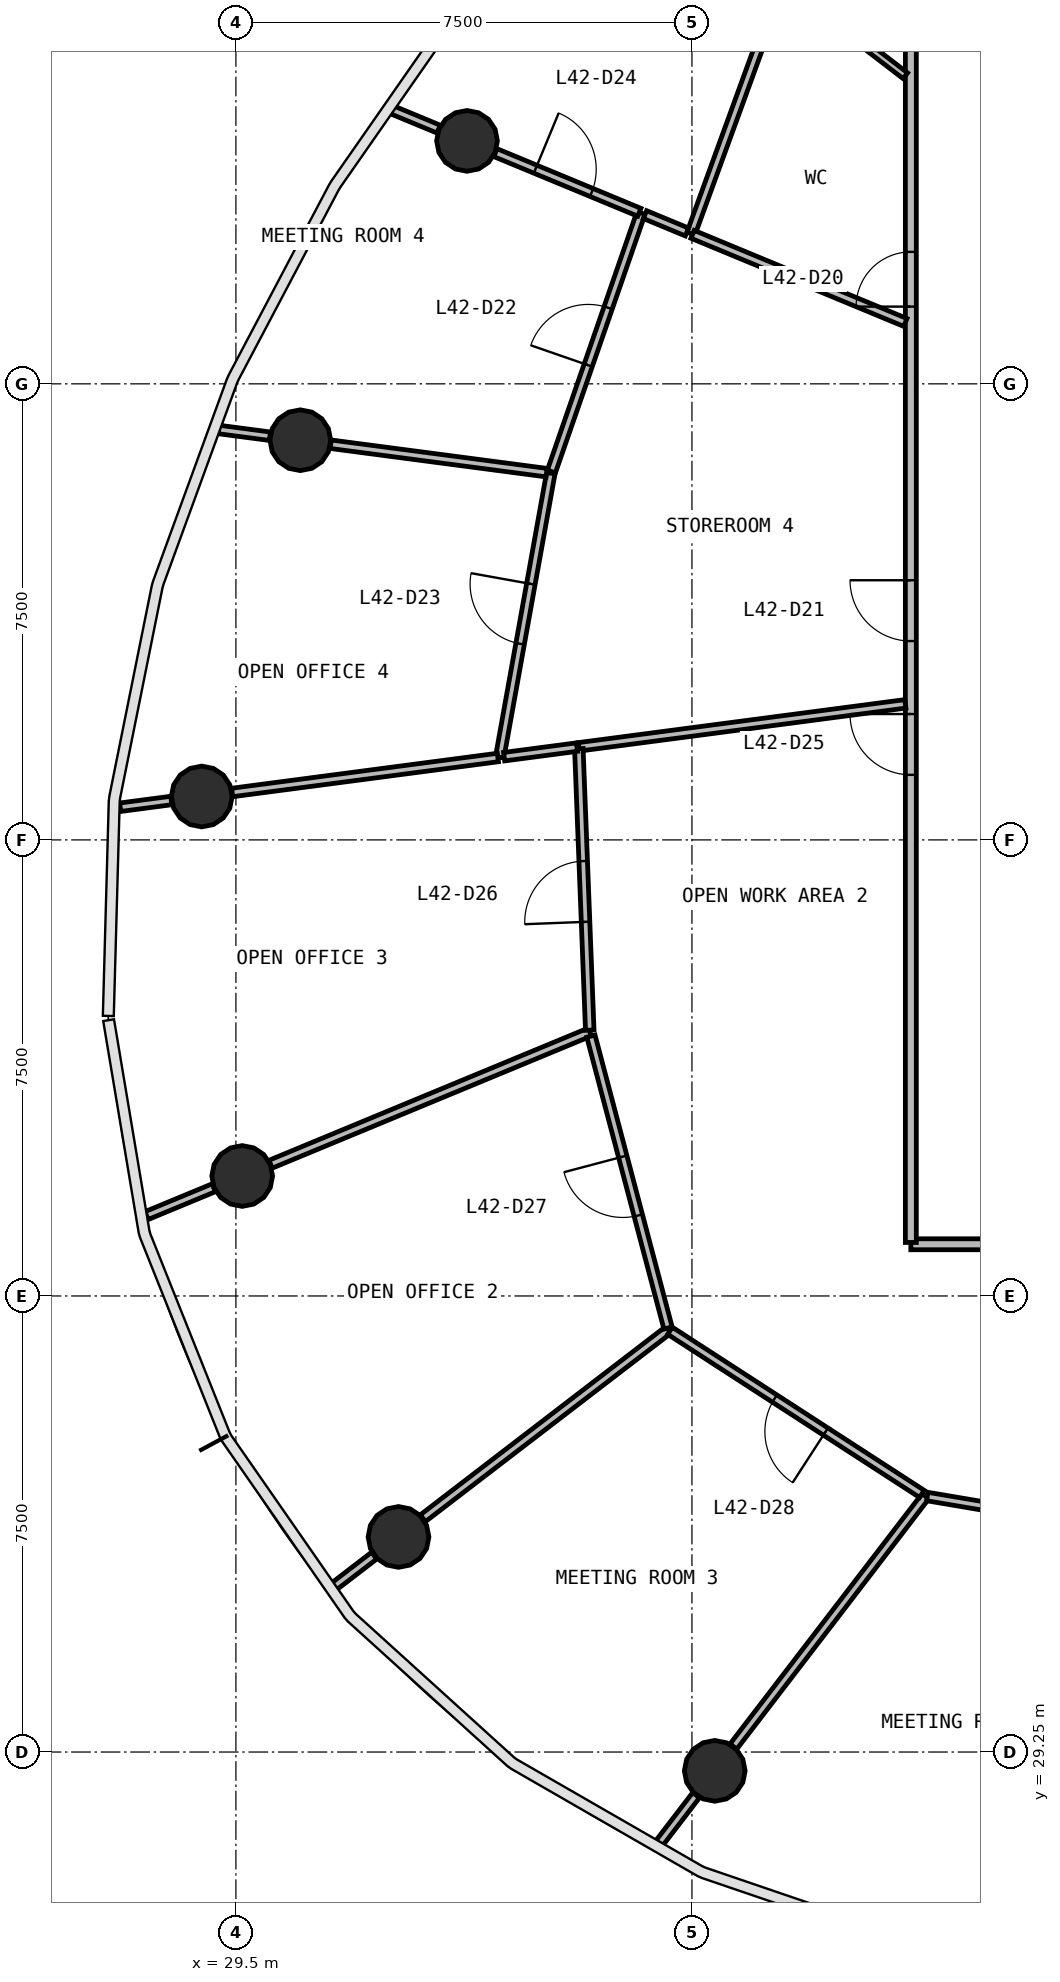
"""IFC4 building model, lengths in metres.
Left out: names, types, materials, properties, quantities, classifications, styles, units other than length and angle.
Written with IfcOpenShell. Run it as: python <this file> out.ifc"""

import sys

from ifc_helpers import new_model, si_unit, direction, frame, frame_2d, origin, origin_2d, place, context, subcontext, project, spatial, rectangle, circle, extrude, source, transform, mapped, element, fill, save


model = new_model("IFC4")
c1 = context("Model", 3, precision=1e-05, world=origin(), true_north=direction((0.0, 1.0)))
c2 = subcontext(c1, "Body", "Model", "MODEL_VIEW")
j1 = project(units=[si_unit("LENGTHUNIT", "METRE"), si_unit("PLANEANGLEUNIT", "RADIAN")], contexts=[c1])
p1 = place(None, origin())
s1 = spatial("IfcSite", under=j1, at=p1, CompositionType="ELEMENT")
p2 = place(p1, origin())
s2 = spatial("IfcBuilding", under=s1, at=p2, CompositionType="ELEMENT")
p3 = place(p2, frame((0.0, 0.0, 176.0)))
s3 = spatial("IfcBuildingStorey", under=s2, at=p3, CompositionType="ELEMENT", Elevation=176.0)
m1 = source(origin(), c2, "Body", "SweptSolid", [
    extrude(circle(Radius=0.5, at=origin_2d()), origin(), (0.0, 0.0, 1.0), 3.9),
])
for number, where, z_axis, x_axis in (
    (1, (33.301, 55.746, 0.0), (0.0, 0.0, 1.0), (1.0, 0.0, 0.0)),
    (2, (30.559, 50.823, 0.0), (0.0, 0.0, 1.0), (1.0, 0.0, 0.0)),
    (3, (28.938, 44.964, 0.0), (0.0, 0.0, 1.0), (1.0, 0.0, 0.0)),
    (4, (29.603, 38.723, 0.0), (0.0, 0.0, 1.0), (1.0, 0.0, 0.0)),
    (5, (32.174, 32.787, 0.0), (0.0, 0.0, 1.0), (1.0, 0.0, 0.0)),
    (6, (37.375, 28.94, 0.0), (0.0, 0.0, 1.0), (1.0, 0.0, 0.0)),
):
    element("IfcColumn", number, at=place(p3, frame(where, z_axis=z_axis, x_axis=x_axis)), inside=s3, PredefinedType="COLUMN", context=c2, shape_type="MappedRepresentation", body=[
        mapped(m1, transform((0.0, 0.0, 0.0), scale=1.0)),
    ])
p4 = place(p3, frame((63.4, 37.6, 0.0), z_axis=(0.0, 0.0, 1.0), x_axis=(-1.0, 0.0, 0.0)))
e7 = element("IfcWall", 7, at=p4, inside=s3, PredefinedType="PARTITIONING", context=c2, shape_type="SweptSolid", body=[
    extrude(rectangle(XDim=22.8, YDim=0.18, at=frame_2d((11.4, 0.0))), origin(), (0.0, 0.0, 1.0), 2.7),
])
p5 = place(p4, frame((10.95, 0.0, 0.0)))
e8 = element("IfcOpeningElement", 8, at=p5, cuts=e7, PredefinedType="OPENING", context=c2, shape_type="SweptSolid", body=[
    extrude(rectangle(XDim=1.0, YDim=2.1, at=frame_2d((0.5, 1.05))), frame((0.0, 0.1, 0.0), z_axis=(0.0, -1.0, 0.0), x_axis=(1.0, 0.0, 0.0)), (0.0, 0.0, 1.0), 0.2),
])
p6 = place(p3, frame((40.6, 37.63, 0.0), z_axis=(0.0, 0.0, 1.0), x_axis=(0.0, 1.0, 0.0)))
e9 = element("IfcWall", 9, at=p6, inside=s3, PredefinedType="PARTITIONING", context=c2, shape_type="SweptSolid", body=[
    extrude(rectangle(XDim=20.74, YDim=0.18, at=frame_2d((10.37, 0.0))), origin(), (0.0, 0.0, 1.0), 2.7),
])
p7 = place(p6, frame((15.39, 0.0, 0.0)))
e10 = element("IfcOpeningElement", 10, at=p7, cuts=e9, PredefinedType="OPENING", context=c2, shape_type="SweptSolid", body=[
    extrude(rectangle(XDim=0.9, YDim=2.1, at=frame_2d((0.45, 1.05))), frame((0.0, 0.1, 0.0), z_axis=(0.0, -1.0, 0.0), x_axis=(1.0, 0.0, 0.0)), (0.0, 0.0, 1.0), 0.2),
])
p8 = place(p6, frame((9.89, 0.0, 0.0)))
e11 = element("IfcOpeningElement", 11, at=p8, cuts=e9, PredefinedType="OPENING", context=c2, shape_type="SweptSolid", body=[
    extrude(rectangle(XDim=1.0, YDim=2.1, at=frame_2d((0.5, 1.05))), frame((0.0, 0.1, 0.0), z_axis=(0.0, -1.0, 0.0), x_axis=(1.0, 0.0, 0.0)), (0.0, 0.0, 1.0), 0.2),
])
p9 = place(p6, frame((7.69, 0.0, 0.0)))
e12 = element("IfcOpeningElement", 12, at=p9, cuts=e9, PredefinedType="OPENING", context=c2, shape_type="SweptSolid", body=[
    extrude(rectangle(XDim=1.0, YDim=2.1, at=frame_2d((0.5, 1.05))), frame((0.0, 0.1, 0.0), z_axis=(0.0, -1.0, 0.0), x_axis=(1.0, 0.0, 0.0)), (0.0, 0.0, 1.0), 0.2),
])
p10 = place(p3, frame((35.321, 41.091, 0.0), z_axis=(0.0, 0.0, 1.0), x_axis=(-0.923886990837, -0.382665425879, 0.0)))
e13 = element("IfcWall", 13, at=p10, inside=s3, PredefinedType="PARTITIONING", context=c2, shape_type="SweptSolid", body=[
    extrude(rectangle(XDim=5.683, YDim=0.14, at=frame_2d((2.842, 0.0))), origin(), (0.0, 0.0, 1.0), 2.7),
])
p11 = place(p3, frame((40.51, 46.487, 0.0), z_axis=(0.0, 0.0, 1.0), x_axis=(-0.991447698831, -0.130504637781, 0.0)))
e14 = element("IfcWall", 14, at=p11, inside=s3, PredefinedType="PARTITIONING", context=c2, shape_type="SweptSolid", body=[
    extrude(rectangle(XDim=5.418, YDim=0.14, at=frame_2d((2.709, 0.0))), origin(), (0.0, 0.0, 1.0), 2.7),
])
p12 = place(p3, frame((40.841, 33.457, 0.0), z_axis=(0.0, 0.0, 1.0), x_axis=(-0.608780216018, -0.793338924159, 0.0)))
e15 = element("IfcWall", 15, at=p12, inside=s3, PredefinedType="PARTITIONING", context=c2, shape_type="SweptSolid", body=[
    extrude(rectangle(XDim=5.188, YDim=0.14, at=frame_2d((2.594, 0.0))), origin(), (0.0, 0.0, 1.0), 2.7),
])
p13 = place(p3, frame((36.614, 36.194, 0.0), z_axis=(0.0, 0.0, 1.0), x_axis=(-0.79337017358, -0.608739490811, 0.0)))
e16 = element("IfcWall", 16, at=p13, inside=s3, PredefinedType="PARTITIONING", context=c2, shape_type="SweptSolid", body=[
    extrude(rectangle(XDim=5.092, YDim=0.14, at=frame_2d((2.546, 0.0))), origin(), (0.0, 0.0, 1.0), 2.7),
])
p14 = place(p3, frame((36.607, 36.223, 0.0), z_axis=(0.0, 0.0, 1.0), x_axis=(-0.255485666684, 0.966812843377, 0.0)))
e17 = element("IfcWall", 17, at=p14, inside=s3, PredefinedType="PARTITIONING", context=c2, shape_type="SweptSolid", body=[
    extrude(rectangle(XDim=4.964, YDim=0.14, at=frame_2d((2.482, 0.0))), origin(), (0.0, 0.0, 1.0), 2.7),
])
p15 = place(p14, frame((1.914, 0.0, 0.0)))
e18 = element("IfcOpeningElement", 18, at=p15, cuts=e17, PredefinedType="OPENING", context=c2, shape_type="SweptSolid", body=[
    extrude(rectangle(XDim=1.0, YDim=2.1, at=frame_2d((0.5, 1.05))), frame((0.0, 0.08, 0.0), z_axis=(0.0, -1.0, 0.0), x_axis=(1.0, 0.0, 0.0)), (0.0, 0.0, 1.0), 0.16),
])
p16 = place(p3, frame((40.782, 33.495, 0.0), z_axis=(0.0, 0.0, 1.0), x_axis=(-0.839336490457, 0.543612229247, 0.0)))
e19 = element("IfcWall", 19, at=p16, inside=s3, PredefinedType="PARTITIONING", context=c2, shape_type="SweptSolid", body=[
    extrude(rectangle(XDim=4.935, YDim=0.14, at=frame_2d((2.468, 0.0))), origin(), (0.0, 0.0, 1.0), 2.7),
])
p17 = place(p16, frame((1.885, 0.0, 0.0)))
e20 = element("IfcOpeningElement", 20, at=p17, cuts=e19, PredefinedType="OPENING", context=c2, shape_type="SweptSolid", body=[
    extrude(rectangle(XDim=1.0, YDim=2.1, at=frame_2d((0.5, 1.05))), frame((0.0, 0.08, 0.0), z_axis=(0.0, -1.0, 0.0), x_axis=(1.0, 0.0, 0.0)), (0.0, 0.0, 1.0), 0.16),
])
p18 = place(p3, frame((45.61, 32.65, 0.0), z_axis=(0.0, 0.0, 1.0), x_axis=(-0.985986026567, 0.166827921569, 0.0)))
e21 = element("IfcWall", 21, at=p18, inside=s3, PredefinedType="PARTITIONING", context=c2, shape_type="SweptSolid", body=[
    extrude(rectangle(XDim=4.807, YDim=0.14, at=frame_2d((2.404, 0.0))), origin(), (0.0, 0.0, 1.0), 2.7),
])
p19 = place(p18, frame((1.957, 0.0, 0.0)))
e22 = element("IfcOpeningElement", 22, at=p19, cuts=e21, PredefinedType="OPENING", context=c2, shape_type="SweptSolid", body=[
    extrude(rectangle(XDim=1.0, YDim=2.1, at=frame_2d((0.5, 1.05))), frame((0.0, 0.08, 0.0), z_axis=(0.0, -1.0, 0.0), x_axis=(1.0, 0.0, 0.0)), (0.0, 0.0, 1.0), 0.16),
])
p20 = place(p3, frame((33.838, 45.609, 0.0), z_axis=(0.0, 0.0, 1.0), x_axis=(0.177038409818, 0.984203943016, 0.0)))
e23 = element("IfcWall", 23, at=p20, inside=s3, PredefinedType="PARTITIONING", context=c2, shape_type="SweptSolid", body=[
    extrude(rectangle(XDim=4.747, YDim=0.14, at=frame_2d((2.373, 0.0))), origin(), (0.0, 0.0, 1.0), 2.7),
])
p21 = place(p20, frame((1.896, 0.0, 0.0)))
e24 = element("IfcOpeningElement", 24, at=p21, cuts=e23, PredefinedType="OPENING", context=c2, shape_type="SweptSolid", body=[
    extrude(rectangle(XDim=1.0, YDim=2.1, at=frame_2d((0.5, 1.05))), frame((0.0, 0.08, 0.0), z_axis=(0.0, -1.0, 0.0), x_axis=(1.0, 0.0, 0.0)), (0.0, 0.0, 1.0), 0.16),
])
p22 = place(p3, frame((35.319, 41.121, 0.0), z_axis=(0.0, 0.0, 1.0), x_axis=(-0.038734687245, 0.9992495304, 0.0)))
e25 = element("IfcWall", 25, at=p22, inside=s3, PredefinedType="PARTITIONING", context=c2, shape_type="SweptSolid", body=[
    extrude(rectangle(XDim=4.633, YDim=0.14, at=frame_2d((2.316, 0.0))), origin(), (0.0, 0.0, 1.0), 2.7),
])
p23 = place(p22, frame((1.783, 0.0, 0.0)))
e26 = element("IfcOpeningElement", 26, at=p23, cuts=e25, PredefinedType="OPENING", context=c2, shape_type="SweptSolid", body=[
    extrude(rectangle(XDim=1.0, YDim=2.1, at=frame_2d((0.5, 1.05))), frame((0.0, 0.08, 0.0), z_axis=(0.0, -1.0, 0.0), x_axis=(1.0, 0.0, 0.0)), (0.0, 0.0, 1.0), 0.16),
])
p24 = place(p3, frame((34.689, 50.309, 0.0), z_axis=(0.0, 0.0, 1.0), x_axis=(0.327550319444, 0.944833735761, 0.0)))
e27 = element("IfcWall", 27, at=p24, inside=s3, PredefinedType="PARTITIONING", context=c2, shape_type="SweptSolid", body=[
    extrude(rectangle(XDim=4.5, YDim=0.14, at=frame_2d((2.25, 0.0))), origin(), (0.0, 0.0, 1.0), 2.7),
])
p25 = place(p24, frame((1.85, 0.0, 0.0)))
e28 = element("IfcOpeningElement", 28, at=p25, cuts=e27, PredefinedType="OPENING", context=c2, shape_type="SweptSolid", body=[
    extrude(rectangle(XDim=1.0, YDim=2.1, at=frame_2d((0.5, 1.05))), frame((0.0, 0.08, 0.0), z_axis=(0.0, -1.0, 0.0), x_axis=(1.0, 0.0, 0.0)), (0.0, 0.0, 1.0), 0.16),
])
p26 = place(p3, frame((33.809, 45.605, 0.0), z_axis=(0.0, 0.0, 1.0), x_axis=(-0.991450902156, -0.130480299714, 0.0)))
e29 = element("IfcWall", 29, at=p26, inside=s3, PredefinedType="PARTITIONING", context=c2, shape_type="SweptSolid", body=[
    extrude(rectangle(XDim=4.408, YDim=0.14, at=frame_2d((2.204, 0.0))), origin(), (0.0, 0.0, 1.0), 2.7),
])
p27 = place(p3, frame((38.482, 58.337, 0.0), z_axis=(0.0, 0.0, 1.0), x_axis=(-0.342007049078, -0.939697386599, 0.0)))
e30 = element("IfcWall", 30, at=p27, inside=s3, PredefinedType="PARTITIONING", context=c2, shape_type="SweptSolid", body=[
    extrude(rectangle(XDim=4.381, YDim=0.14, at=frame_2d((2.19, 0.0))), origin(), (0.0, 0.0, 1.0), 2.7),
])
p28 = place(p3, frame((40.51, 52.759, 0.0), z_axis=(0.0, 0.0, 1.0), x_axis=(-0.92389112775, 0.382655437784, 0.0)))
e31 = element("IfcWall", 31, at=p28, inside=s3, PredefinedType="PARTITIONING", context=c2, shape_type="SweptSolid", body=[
    extrude(rectangle(XDim=3.787, YDim=0.14, at=frame_2d((1.894, 0.0))), origin(), (0.0, 0.0, 1.0), 2.7),
])
p29 = place(p3, frame((34.609, 50.29, 0.0), z_axis=(0.0, 0.0, 1.0), x_axis=(-0.991449189531, 0.130493312389, 0.0)))
e32 = element("IfcWall", 32, at=p29, inside=s3, PredefinedType="PARTITIONING", context=c2, shape_type="SweptSolid", body=[
    extrude(rectangle(XDim=3.581, YDim=0.14, at=frame_2d((1.791, 0.0))), origin(), (0.0, 0.0, 1.0), 2.7),
])
p30 = place(p3, frame((33.767, 55.552, 0.0), z_axis=(0.0, 0.0, 1.0), x_axis=(0.923880985108, -0.382679925467, 0.0)))
e33 = element("IfcWall", 33, at=p30, inside=s3, PredefinedType="PARTITIONING", context=c2, shape_type="SweptSolid", body=[
    extrude(rectangle(XDim=2.563, YDim=0.14, at=frame_2d((1.281, 0.0))), origin(), (0.0, 0.0, 1.0), 2.7),
])
p31 = place(p30, frame((0.713, 0.0, 0.0)))
e34 = element("IfcOpeningElement", 34, at=p31, cuts=e33, PredefinedType="OPENING", context=c2, shape_type="SweptSolid", body=[
    extrude(rectangle(XDim=1.0, YDim=2.1, at=frame_2d((0.5, 1.05))), frame((0.0, 0.08, 0.0), z_axis=(0.0, -1.0, 0.0), x_axis=(1.0, 0.0, 0.0)), (0.0, 0.0, 1.0), 0.16),
])
p32 = place(p3, frame((35.109, 45.776, 0.0), z_axis=(0.0, 0.0, 1.0), x_axis=(-0.991468047208, -0.130349957287, 0.0)))
e35 = element("IfcWall", 35, at=p32, inside=s3, PredefinedType="PARTITIONING", context=c2, shape_type="SweptSolid", body=[
    extrude(rectangle(XDim=1.208, YDim=0.14, at=frame_2d((0.604, 0.0))), origin(), (0.0, 0.0, 1.0), 2.7),
])
p33 = place(p3, frame((29.137, 38.53, 0.0), z_axis=(0.0, 0.0, 1.0), x_axis=(-0.923882723383, -0.382675728829, 0.0)))
e36 = element("IfcWall", 36, at=p33, inside=s3, PredefinedType="PARTITIONING", context=c2, shape_type="SweptSolid", body=[
    extrude(rectangle(XDim=1.198, YDim=0.14, at=frame_2d((0.599, 0.0))), origin(), (0.0, 0.0, 1.0), 2.7),
])
p34 = place(p3, frame((37.068, 28.54, 0.0), z_axis=(0.0, 0.0, 1.0), x_axis=(-0.608815264587, -0.793312027897, 0.0)))
e37 = element("IfcWall", 37, at=p34, inside=s3, PredefinedType="PARTITIONING", context=c2, shape_type="SweptSolid", body=[
    extrude(rectangle(XDim=1.015, YDim=0.14, at=frame_2d((0.507, 0.0))), origin(), (0.0, 0.0, 1.0), 2.7),
])
p35 = place(p3, frame((36.919, 54.247, 0.0), z_axis=(0.0, 0.0, 1.0), x_axis=(-0.923885623343, 0.382668727465, 0.0)))
e38 = element("IfcWall", 38, at=p35, inside=s3, PredefinedType="PARTITIONING", context=c2, shape_type="SweptSolid", body=[
    extrude(rectangle(XDim=0.748, YDim=0.14, at=frame_2d((0.374, 0.0))), origin(), (0.0, 0.0, 1.0), 2.7),
])
p36 = place(p3, frame((30.059, 50.889, 0.0), z_axis=(0.0, 0.0, 1.0), x_axis=(-0.991446500326, 0.130513742537, 0.0)))
e39 = element("IfcWall", 39, at=p36, inside=s3, PredefinedType="PARTITIONING", context=c2, shape_type="SweptSolid", body=[
    extrude(rectangle(XDim=0.853, YDim=0.14, at=frame_2d((0.427, 0.0))), origin(), (0.0, 0.0, 1.0), 2.7),
])
p37 = place(p3, frame((28.438, 44.898, 0.0), z_axis=(0.0, 0.0, 1.0), x_axis=(-0.991432738393, -0.130618242377, 0.0)))
e40 = element("IfcWall", 40, at=p37, inside=s3, PredefinedType="PARTITIONING", context=c2, shape_type="SweptSolid", body=[
    extrude(rectangle(XDim=0.849, YDim=0.14, at=frame_2d((0.424, 0.0))), origin(), (0.0, 0.0, 1.0), 2.7),
])
p38 = place(p3, frame((31.774, 32.48, 0.0), z_axis=(0.0, 0.0, 1.0), x_axis=(-0.793296212725, -0.608835871871, 0.0)))
e41 = element("IfcWall", 41, at=p38, inside=s3, PredefinedType="PARTITIONING", context=c2, shape_type="SweptSolid", body=[
    extrude(rectangle(XDim=0.836, YDim=0.14, at=frame_2d((0.418, 0.0))), origin(), (0.0, 0.0, 1.0), 2.7),
])
p39 = place(p3, frame((32.834, 55.939, 0.0), z_axis=(0.0, 0.0, 1.0), x_axis=(-0.923909393783, 0.382611332921, 0.0)))
e42 = element("IfcWall", 42, at=p39, inside=s3, PredefinedType="PARTITIONING", context=c2, shape_type="SweptSolid", body=[
    extrude(rectangle(XDim=0.831, YDim=0.14, at=frame_2d((0.416, 0.0))), origin(), (0.0, 0.0, 1.0), 2.7),
])
p40 = place(p3, frame((40.51, 56.817, 0.0), z_axis=(0.0, 0.0, 1.0), x_axis=(-0.793380380559, 0.608726187825, 0.0)))
e43 = element("IfcWall", 43, at=p40, inside=s3, PredefinedType="PARTITIONING", context=c2, shape_type="SweptSolid", body=[
    extrude(rectangle(XDim=2.47, YDim=0.12, at=frame_2d((1.235, 0.0))), origin(), (0.0, 0.0, 1.0), 2.7),
])
m2 = source(origin(), c2, "Body", "SweptSolid", [
    extrude(rectangle(XDim=0.9, YDim=2.1, at=frame_2d((0.45, 1.05))), frame((0.0, 0.025, 0.0), z_axis=(0.0, -1.0, 0.0), x_axis=(1.0, 0.0, 0.0)), (0.0, 0.0, 1.0), 0.05),
])
p41 = place(p7, origin())
e44 = element("IfcDoor", 44, at=p41, inside=s3, OperationType="SINGLE_SWING_LEFT", PredefinedType="DOOR", context=c2, shape_type="MappedRepresentation", body=[
    mapped(m2, transform((0.0, 0.0, 0.0), scale=1.0)),
])
fill(e10, e44)
m3 = source(origin(), c2, "Body", "SweptSolid", [
    extrude(rectangle(XDim=1.0, YDim=2.1, at=frame_2d((0.5, 1.05))), frame((0.0, 0.025, 0.0), z_axis=(0.0, -1.0, 0.0), x_axis=(1.0, 0.0, 0.0)), (0.0, 0.0, 1.0), 0.05),
])
p42 = place(p8, origin())
e45 = element("IfcDoor", 45, at=p42, inside=s3, OperationType="SINGLE_SWING_RIGHT", PredefinedType="DOOR", context=c2, shape_type="MappedRepresentation", body=[
    mapped(m3, transform((0.0, 0.0, 0.0), scale=1.0)),
])
fill(e11, e45)
p43 = place(p25, origin())
e46 = element("IfcDoor", 46, at=p43, inside=s3, OperationType="SINGLE_SWING_LEFT", PredefinedType="DOOR", context=c2, shape_type="MappedRepresentation", body=[
    mapped(m3, transform((0.0, 0.0, 0.0), scale=1.0)),
])
fill(e28, e46)
p44 = place(p21, origin())
e47 = element("IfcDoor", 47, at=p44, inside=s3, OperationType="SINGLE_SWING_RIGHT", PredefinedType="DOOR", context=c2, shape_type="MappedRepresentation", body=[
    mapped(m3, transform((0.0, 0.0, 0.0), scale=1.0)),
])
fill(e24, e47)
p45 = place(p31, origin())
e48 = element("IfcDoor", 48, at=p45, inside=s3, OperationType="SINGLE_SWING_LEFT", PredefinedType="DOOR", context=c2, shape_type="MappedRepresentation", body=[
    mapped(m3, transform((0.0, 0.0, 0.0), scale=1.0)),
])
fill(e34, e48)
p46 = place(p9, origin())
e49 = element("IfcDoor", 49, at=p46, inside=s3, OperationType="SINGLE_SWING_RIGHT", PredefinedType="DOOR", context=c2, shape_type="MappedRepresentation", body=[
    mapped(m3, transform((0.0, 0.0, 0.0), scale=1.0)),
])
fill(e12, e49)
p47 = place(p23, origin())
e50 = element("IfcDoor", 50, at=p47, inside=s3, OperationType="SINGLE_SWING_LEFT", PredefinedType="DOOR", context=c2, shape_type="MappedRepresentation", body=[
    mapped(m3, transform((0.0, 0.0, 0.0), scale=1.0)),
])
fill(e26, e50)
p48 = place(p15, origin())
e51 = element("IfcDoor", 51, at=p48, inside=s3, OperationType="SINGLE_SWING_RIGHT", PredefinedType="DOOR", context=c2, shape_type="MappedRepresentation", body=[
    mapped(m3, transform((0.0, 0.0, 0.0), scale=1.0)),
])
fill(e18, e51)
p49 = place(p17, origin())
e52 = element("IfcDoor", 52, at=p49, inside=s3, OperationType="SINGLE_SWING_LEFT", PredefinedType="DOOR", context=c2, shape_type="MappedRepresentation", body=[
    mapped(m3, transform((0.0, 0.0, 0.0), scale=1.0)),
])
fill(e20, e52)
save(model, sys.argv[1])
